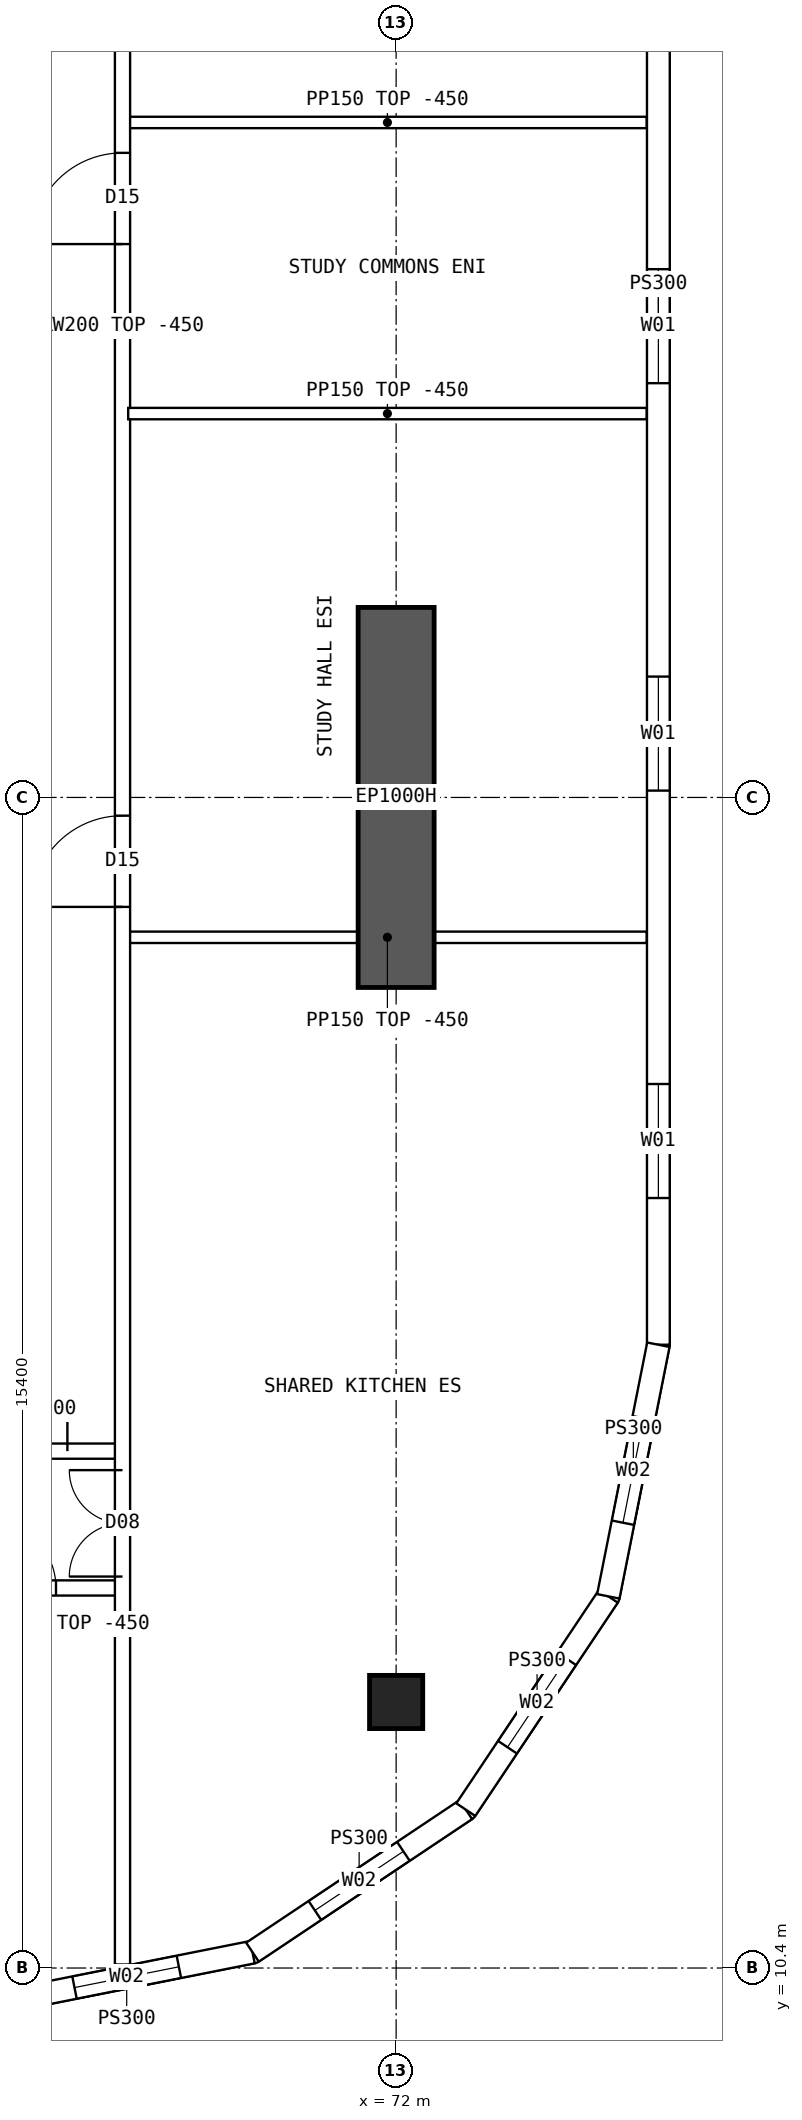
"""IFC4 building model, lengths in metres.
Left out: names, types, materials, properties, quantities, classifications, styles, units other than length and angle.
Written with IfcOpenShell. Run it as: python <this file> out.ifc"""

import sys

from ifc_helpers import new_model, si_unit, direction, frame, frame_2d, origin, origin_2d, place, context, subcontext, project, spatial, polyline, rectangle, hollow_rectangle, outline, extrude, element, fill, save


model = new_model("IFC4")
c1 = context("Model", 3, precision=1e-05, world=origin(), true_north=direction((0.0, 1.0)))
c2 = subcontext(c1, "Body", "Model", "MODEL_VIEW")
j1 = project(units=[si_unit("LENGTHUNIT", "METRE"), si_unit("PLANEANGLEUNIT", "RADIAN")], contexts=[c1])
p1 = place(None, origin())
s1 = spatial("IfcSite", under=j1, at=p1, CompositionType="ELEMENT")
p2 = place(p1, origin())
s2 = spatial("IfcBuilding", under=s1, at=p2, CompositionType="ELEMENT")
p3 = place(p2, frame((0.0, 0.0, 174.85)))
s3 = spatial("IfcBuildingStorey", under=s2, at=p3, CompositionType="ELEMENT", Elevation=174.85)
p4 = place(p3, frame((72.0, 13.9, 0.0), z_axis=(0.0, 0.0, 1.0), x_axis=(1.0, 0.0, 0.0)))
e1 = element("IfcColumn", 1, at=p4, inside=s3, PredefinedType="COLUMN", context=c2, shape_type="SweptSolid", body=[
    extrude(hollow_rectangle(XDim=0.7, YDim=0.7, WallThickness=0.07, at=origin_2d()), origin(), (0.0, 0.0, 1.0), 3.75),
])
p5 = place(p3, frame((72.0, 23.3, 0.0), z_axis=(0.0, 0.0, 1.0), x_axis=(0.0, 1.0, 0.0)))
e2 = element("IfcWall", 2, at=p5, inside=s3, PredefinedType="SHEAR", context=c2, shape_type="SweptSolid", body=[
    extrude(rectangle(XDim=5.0, YDim=1.0, at=frame_2d((2.5, 0.0))), origin(), (0.0, 0.0, 1.0), 3.75),
])
p6 = place(p3, frame((75.45, 18.6, 0.0), z_axis=(0.0, 0.0, 1.0), x_axis=(0.0, 1.0, 0.0)))
e3 = element("IfcWall", 3, at=p6, inside=s3, PredefinedType="SOLIDWALL", context=c2, shape_type="SweptSolid", body=[
    extrude(outline(polyline([(-0.015, -0.15), (26.815, -0.15), (26.785, 0.15), (0.015, 0.15), (-0.015, -0.15)])), origin(), (0.0, 0.0, 1.0), 3.3),
])
p7 = place(p6, frame((1.93, 0.0, 0.9)))
e4 = element("IfcOpeningElement", 4, at=p7, cuts=e3, PredefinedType="OPENING", context=c2, shape_type="SweptSolid", body=[
    extrude(rectangle(XDim=1.5, YDim=2.0, at=frame_2d((0.75, 1.0))), frame((0.0, 0.16, 0.0), z_axis=(0.0, -1.0, 0.0), x_axis=(1.0, 0.0, 0.0)), (0.0, 0.0, 1.0), 0.32),
])
p8 = place(p6, frame((7.29, 0.0, 0.9)))
e5 = element("IfcOpeningElement", 5, at=p8, cuts=e3, PredefinedType="OPENING", context=c2, shape_type="SweptSolid", body=[
    extrude(rectangle(XDim=1.5, YDim=2.0, at=frame_2d((0.75, 1.0))), frame((0.0, 0.16, 0.0), z_axis=(0.0, -1.0, 0.0), x_axis=(1.0, 0.0, 0.0)), (0.0, 0.0, 1.0), 0.32),
])
p9 = place(p6, frame((12.65, 0.0, 0.9)))
e6 = element("IfcOpeningElement", 6, at=p9, cuts=e3, PredefinedType="OPENING", context=c2, shape_type="SweptSolid", body=[
    extrude(rectangle(XDim=1.5, YDim=2.0, at=frame_2d((0.75, 1.0))), frame((0.0, 0.16, 0.0), z_axis=(0.0, -1.0, 0.0), x_axis=(1.0, 0.0, 0.0)), (0.0, 0.0, 1.0), 0.32),
])
p10 = place(p6, frame((18.01, 0.0, 0.9)))
e7 = element("IfcOpeningElement", 7, at=p10, cuts=e3, PredefinedType="OPENING", context=c2, shape_type="SweptSolid", body=[
    extrude(rectangle(XDim=1.5, YDim=2.0, at=frame_2d((0.75, 1.0))), frame((0.0, 0.16, 0.0), z_axis=(0.0, -1.0, 0.0), x_axis=(1.0, 0.0, 0.0)), (0.0, 0.0, 1.0), 0.32),
])
p11 = place(p6, frame((23.37, 0.0, 0.9)))
e8 = element("IfcOpeningElement", 8, at=p11, cuts=e3, PredefinedType="OPENING", context=c2, shape_type="SweptSolid", body=[
    extrude(rectangle(XDim=1.5, YDim=2.0, at=frame_2d((0.75, 1.0))), frame((0.0, 0.16, 0.0), z_axis=(0.0, -1.0, 0.0), x_axis=(1.0, 0.0, 0.0)), (0.0, 0.0, 1.0), 0.32),
])
p12 = place(p3, frame((66.8, 9.95, 0.0), z_axis=(0.0, 0.0, 1.0), x_axis=(0.98078325777, 0.195100490205, 0.0)))
e9 = element("IfcWall", 9, at=p12, inside=s3, PredefinedType="SOLIDWALL", context=c2, shape_type="SweptSolid", body=[
    extrude(outline(polyline([(-0.03, -0.15), (3.405, -0.15), (3.345, 0.15), (0.03, 0.15), (-0.03, -0.15)])), origin(), (0.0, 0.0, 1.0), 3.3),
])
p13 = place(p12, frame((0.988, 0.0, 0.9)))
e10 = element("IfcOpeningElement", 10, at=p13, cuts=e9, PredefinedType="OPENING", context=c2, shape_type="SweptSolid", body=[
    extrude(rectangle(XDim=1.4, YDim=1.8, at=frame_2d((0.7, 0.9))), frame((0.0, 0.16, 0.0), z_axis=(0.0, -1.0, 0.0), x_axis=(1.0, 0.0, 0.0)), (0.0, 0.0, 1.0), 0.32),
])
p14 = place(p3, frame((70.11, 10.608, 0.0), z_axis=(0.0, 0.0, 1.0), x_axis=(0.831493450887, 0.555534554399, 0.0)))
e11 = element("IfcWall", 11, at=p14, inside=s3, PredefinedType="SOLIDWALL", context=c2, shape_type="SweptSolid", body=[
    extrude(outline(polyline([(-0.03, -0.15), (3.405, -0.15), (3.345, 0.15), (0.03, 0.15), (-0.03, -0.15)])), origin(), (0.0, 0.0, 1.0), 3.3),
])
p15 = place(p14, frame((0.988, 0.0, 0.9)))
e12 = element("IfcOpeningElement", 12, at=p15, cuts=e11, PredefinedType="OPENING", context=c2, shape_type="SweptSolid", body=[
    extrude(rectangle(XDim=1.4, YDim=1.8, at=frame_2d((0.7, 0.9))), frame((0.0, 0.16, 0.0), z_axis=(0.0, -1.0, 0.0), x_axis=(1.0, 0.0, 0.0)), (0.0, 0.0, 1.0), 0.32),
])
p16 = place(p3, frame((72.917, 12.483, 0.0), z_axis=(0.0, 0.0, 1.0), x_axis=(0.555534554399, 0.831493450887, 0.0)))
e13 = element("IfcWall", 13, at=p16, inside=s3, PredefinedType="SOLIDWALL", context=c2, shape_type="SweptSolid", body=[
    extrude(outline(polyline([(-0.03, -0.15), (3.405, -0.15), (3.345, 0.15), (0.03, 0.15), (-0.03, -0.15)])), origin(), (0.0, 0.0, 1.0), 3.3),
])
p17 = place(p16, frame((0.988, 0.0, 0.9)))
e14 = element("IfcOpeningElement", 14, at=p17, cuts=e13, PredefinedType="OPENING", context=c2, shape_type="SweptSolid", body=[
    extrude(rectangle(XDim=1.4, YDim=1.8, at=frame_2d((0.7, 0.9))), frame((0.0, 0.16, 0.0), z_axis=(0.0, -1.0, 0.0), x_axis=(1.0, 0.0, 0.0)), (0.0, 0.0, 1.0), 0.32),
])
p18 = place(p3, frame((74.792, 15.29, 0.0), z_axis=(0.0, 0.0, 1.0), x_axis=(0.19508664885, 0.980786011034, 0.0)))
e15 = element("IfcWall", 15, at=p18, inside=s3, PredefinedType="SOLIDWALL", context=c2, shape_type="SweptSolid", body=[
    extrude(outline(polyline([(-0.03, -0.15), (3.39, -0.15), (3.36, 0.15), (0.03, 0.15), (-0.03, -0.15)])), origin(), (0.0, 0.0, 1.0), 3.3),
])
p19 = place(p18, frame((0.988, 0.0, 0.9)))
e16 = element("IfcOpeningElement", 16, at=p19, cuts=e15, PredefinedType="OPENING", context=c2, shape_type="SweptSolid", body=[
    extrude(rectangle(XDim=1.4, YDim=1.8, at=frame_2d((0.7, 0.9))), frame((0.0, 0.16, 0.0), z_axis=(0.0, -1.0, 0.0), x_axis=(1.0, 0.0, 0.0)), (0.0, 0.0, 1.0), 0.32),
])
p20 = place(p3, frame((66.425, 15.4, 0.0), z_axis=(0.0, 0.0, 1.0), x_axis=(1.0, 0.0, 0.0)))
e17 = element("IfcWall", 17, at=p20, inside=s3, PredefinedType="SOLIDWALL", context=c2, shape_type="SweptSolid", body=[
    extrude(rectangle(XDim=1.975, YDim=0.2, at=frame_2d((0.987, 0.0))), origin(), (0.0, 0.0, 1.0), 3.3),
])
p21 = place(p20, frame((0.2, 0.0, 0.0)))
e18 = element("IfcOpeningElement", 18, at=p21, cuts=e17, PredefinedType="OPENING", context=c2, shape_type="SweptSolid", body=[
    extrude(rectangle(XDim=0.9, YDim=2.1, at=frame_2d((0.45, 1.05))), frame((0.0, 0.11, 0.0), z_axis=(0.0, -1.0, 0.0), x_axis=(1.0, 0.0, 0.0)), (0.0, 0.0, 1.0), 0.22),
])
p22 = place(p3, frame((66.425, 17.2, 0.0), z_axis=(0.0, 0.0, 1.0), x_axis=(1.0, 0.0, 0.0)))
e19 = element("IfcWall", 19, at=p22, inside=s3, PredefinedType="SOLIDWALL", context=c2, shape_type="SweptSolid", body=[
    extrude(rectangle(XDim=1.975, YDim=0.2, at=frame_2d((0.987, 0.0))), origin(), (0.0, 0.0, 1.0), 3.3),
])
p23 = place(p22, frame((0.05, 0.0, 0.0)))
e20 = element("IfcOpeningElement", 20, at=p23, cuts=e19, PredefinedType="OPENING", context=c2, shape_type="SweptSolid", body=[
    extrude(rectangle(XDim=1.2, YDim=2.1, at=frame_2d((0.6, 1.05))), frame((0.0, 0.11, 0.0), z_axis=(0.0, -1.0, 0.0), x_axis=(1.0, 0.0, 0.0)), (0.0, 0.0, 1.0), 0.22),
])
p24 = place(p3, frame((68.475, 30.85, 0.0), z_axis=(0.0, 0.0, 1.0), x_axis=(1.0, 0.0, 0.0)))
e21 = element("IfcWall", 21, at=p24, inside=s3, PredefinedType="PARTITIONING", context=c2, shape_type="SweptSolid", body=[
    extrude(outline(polyline([(0.0, 0.0), (6.82, 0.0), (6.82, 3.3), (3.827, 3.3), (3.825, 2.85), (3.227, 2.85), (3.225, 3.3), (0.0, 3.3), (0.0, 0.0)])), frame((0.0, 0.075, 0.0), z_axis=(0.0, -1.0, 0.0), x_axis=(1.0, 0.0, 0.0)), (0.0, 0.0, 1.0), 0.15),
])
p25 = place(p3, frame((68.4, 10.446, 0.0), z_axis=(0.0, 0.0, 1.0), x_axis=(0.0, 1.0, 0.0)))
e22 = element("IfcWall", 22, at=p25, inside=s3, PredefinedType="SOLIDWALL", context=c2, shape_type="SweptSolid", body=[
    extrude(rectangle(XDim=43.107, YDim=0.2, at=frame_2d((21.554, 0.0))), origin(), (0.0, 0.0, 1.0), 3.3),
])
p26 = place(p25, frame((13.914, 0.0, 0.0)))
e23 = element("IfcOpeningElement", 23, at=p26, cuts=e22, PredefinedType="OPENING", context=c2, shape_type="SweptSolid", body=[
    extrude(rectangle(XDim=1.2, YDim=2.1, at=frame_2d((0.6, 1.05))), frame((0.0, 0.11, 0.0), z_axis=(0.0, -1.0, 0.0), x_axis=(1.0, 0.0, 0.0)), (0.0, 0.0, 1.0), 0.22),
])
p27 = place(p25, frame((22.634, 0.0, 0.0)))
e24 = element("IfcOpeningElement", 24, at=p27, cuts=e22, PredefinedType="OPENING", context=c2, shape_type="SweptSolid", body=[
    extrude(rectangle(XDim=1.2, YDim=2.1, at=frame_2d((0.6, 1.05))), frame((0.0, 0.11, 0.0), z_axis=(0.0, -1.0, 0.0), x_axis=(1.0, 0.0, 0.0)), (0.0, 0.0, 1.0), 0.22),
])
p28 = place(p25, frame((5.104, 0.0, 0.0)))
e25 = element("IfcOpeningElement", 25, at=p28, cuts=e22, PredefinedType="OPENING", context=c2, shape_type="SweptSolid", body=[
    extrude(rectangle(XDim=1.4, YDim=2.1, at=frame_2d((0.7, 1.05))), frame((0.0, 0.11, 0.0), z_axis=(0.0, -1.0, 0.0), x_axis=(1.0, 0.0, 0.0)), (0.0, 0.0, 1.0), 0.22),
])
p29 = place(p25, frame((36.504, 0.0, 0.0)))
e26 = element("IfcOpeningElement", 26, at=p29, cuts=e22, PredefinedType="OPENING", context=c2, shape_type="SweptSolid", body=[
    extrude(rectangle(XDim=1.4, YDim=2.1, at=frame_2d((0.7, 1.05))), frame((0.0, 0.11, 0.0), z_axis=(0.0, -1.0, 0.0), x_axis=(1.0, 0.0, 0.0)), (0.0, 0.0, 1.0), 0.22),
])
p30 = place(p3, frame((68.475, 23.96, 0.0), z_axis=(0.0, 0.0, 1.0), x_axis=(1.0, 0.0, 0.0)))
e27 = element("IfcWall", 27, at=p30, inside=s3, PredefinedType="PARTITIONING", context=c2, shape_type="SweptSolid", body=[
    extrude(rectangle(XDim=6.82, YDim=0.15, at=frame_2d((3.41, 0.0))), origin(), (0.0, 0.0, 1.0), 3.3),
])
p31 = place(p3, frame((68.475, 34.68, 0.0), z_axis=(0.0, 0.0, 1.0), x_axis=(1.0, 0.0, 0.0)))
e28 = element("IfcWall", 28, at=p31, inside=s3, PredefinedType="PARTITIONING", context=c2, shape_type="SweptSolid", body=[
    extrude(outline(polyline([(0.0, 0.0), (6.82, 0.0), (6.82, 3.3), (3.827, 3.3), (3.825, 2.85), (3.227, 2.85), (3.225, 3.3), (0.0, 3.3), (0.0, 0.0)])), frame((0.0, 0.075, 0.0), z_axis=(0.0, -1.0, 0.0), x_axis=(1.0, 0.0, 0.0)), (0.0, 0.0, 1.0), 0.15),
])
p32 = place(p7, origin())
e29 = element("IfcWindow", 29, at=p32, inside=s3, PartitioningType="SINGLE_PANEL", PredefinedType="WINDOW", context=c2, shape_type="SweptSolid", body=[
    extrude(rectangle(XDim=1.5, YDim=2.0, at=frame_2d((0.75, 1.0))), frame((0.0, 0.03, 0.0), z_axis=(0.0, -1.0, 0.0), x_axis=(1.0, 0.0, 0.0)), (0.0, 0.0, 1.0), 0.06),
])
fill(e4, e29)
p33 = place(p8, origin())
e30 = element("IfcWindow", 30, at=p33, inside=s3, PartitioningType="SINGLE_PANEL", PredefinedType="WINDOW", context=c2, shape_type="SweptSolid", body=[
    extrude(rectangle(XDim=1.5, YDim=2.0, at=frame_2d((0.75, 1.0))), frame((0.0, 0.03, 0.0), z_axis=(0.0, -1.0, 0.0), x_axis=(1.0, 0.0, 0.0)), (0.0, 0.0, 1.0), 0.06),
])
fill(e5, e30)
p34 = place(p9, origin())
e31 = element("IfcWindow", 31, at=p34, inside=s3, PartitioningType="SINGLE_PANEL", PredefinedType="WINDOW", context=c2, shape_type="SweptSolid", body=[
    extrude(rectangle(XDim=1.5, YDim=2.0, at=frame_2d((0.75, 1.0))), frame((0.0, 0.03, 0.0), z_axis=(0.0, -1.0, 0.0), x_axis=(1.0, 0.0, 0.0)), (0.0, 0.0, 1.0), 0.06),
])
fill(e6, e31)
p35 = place(p13, origin())
e32 = element("IfcWindow", 32, at=p35, inside=s3, PartitioningType="SINGLE_PANEL", PredefinedType="WINDOW", context=c2, shape_type="SweptSolid", body=[
    extrude(rectangle(XDim=1.4, YDim=1.8, at=frame_2d((0.7, 0.9))), frame((0.0, 0.03, 0.0), z_axis=(0.0, -1.0, 0.0), x_axis=(1.0, 0.0, 0.0)), (0.0, 0.0, 1.0), 0.06),
])
fill(e10, e32)
p36 = place(p15, origin())
e33 = element("IfcWindow", 33, at=p36, inside=s3, PartitioningType="SINGLE_PANEL", PredefinedType="WINDOW", context=c2, shape_type="SweptSolid", body=[
    extrude(rectangle(XDim=1.4, YDim=1.8, at=frame_2d((0.7, 0.9))), frame((0.0, 0.03, 0.0), z_axis=(0.0, -1.0, 0.0), x_axis=(1.0, 0.0, 0.0)), (0.0, 0.0, 1.0), 0.06),
])
fill(e12, e33)
p37 = place(p17, origin())
e34 = element("IfcWindow", 34, at=p37, inside=s3, PartitioningType="SINGLE_PANEL", PredefinedType="WINDOW", context=c2, shape_type="SweptSolid", body=[
    extrude(rectangle(XDim=1.4, YDim=1.8, at=frame_2d((0.7, 0.9))), frame((0.0, 0.03, 0.0), z_axis=(0.0, -1.0, 0.0), x_axis=(1.0, 0.0, 0.0)), (0.0, 0.0, 1.0), 0.06),
])
fill(e14, e34)
p38 = place(p19, origin())
e35 = element("IfcWindow", 35, at=p38, inside=s3, PartitioningType="SINGLE_PANEL", PredefinedType="WINDOW", context=c2, shape_type="SweptSolid", body=[
    extrude(rectangle(XDim=1.4, YDim=1.8, at=frame_2d((0.7, 0.9))), frame((0.0, 0.03, 0.0), z_axis=(0.0, -1.0, 0.0), x_axis=(1.0, 0.0, 0.0)), (0.0, 0.0, 1.0), 0.06),
])
fill(e16, e35)
p39 = place(p23, origin())
e36 = element("IfcDoor", 36, at=p39, inside=s3, OperationType="DOUBLE_DOOR_SINGLE_SWING", PredefinedType="DOOR", context=c2, shape_type="SweptSolid", body=[
    extrude(rectangle(XDim=1.2, YDim=2.1, at=frame_2d((0.6, 1.05))), frame((0.0, 0.025, 0.0), z_axis=(0.0, -1.0, 0.0), x_axis=(1.0, 0.0, 0.0)), (0.0, 0.0, 1.0), 0.05),
])
fill(e20, e36)
p40 = place(p26, origin())
e37 = element("IfcDoor", 37, at=p40, inside=s3, OperationType="SINGLE_SWING_LEFT", PredefinedType="DOOR", context=c2, shape_type="SweptSolid", body=[
    extrude(rectangle(XDim=1.2, YDim=2.1, at=frame_2d((0.6, 1.05))), frame((0.0, 0.025, 0.0), z_axis=(0.0, -1.0, 0.0), x_axis=(1.0, 0.0, 0.0)), (0.0, 0.0, 1.0), 0.05),
])
fill(e23, e37)
p41 = place(p27, origin())
e38 = element("IfcDoor", 38, at=p41, inside=s3, OperationType="SINGLE_SWING_LEFT", PredefinedType="DOOR", context=c2, shape_type="SweptSolid", body=[
    extrude(rectangle(XDim=1.2, YDim=2.1, at=frame_2d((0.6, 1.05))), frame((0.0, 0.025, 0.0), z_axis=(0.0, -1.0, 0.0), x_axis=(1.0, 0.0, 0.0)), (0.0, 0.0, 1.0), 0.05),
])
fill(e24, e38)
p42 = place(p28, origin())
e39 = element("IfcDoor", 39, at=p42, inside=s3, OperationType="DOUBLE_DOOR_SINGLE_SWING", PredefinedType="DOOR", context=c2, shape_type="SweptSolid", body=[
    extrude(rectangle(XDim=1.4, YDim=2.1, at=frame_2d((0.7, 1.05))), frame((0.0, 0.025, 0.0), z_axis=(0.0, -1.0, 0.0), x_axis=(1.0, 0.0, 0.0)), (0.0, 0.0, 1.0), 0.05),
])
fill(e25, e39)
p43 = place(p21, origin())
e40 = element("IfcDoor", 40, at=p43, inside=s3, OperationType="SINGLE_SWING_LEFT", PredefinedType="DOOR", context=c2, shape_type="SweptSolid", body=[
    extrude(rectangle(XDim=0.9, YDim=2.1, at=frame_2d((0.45, 1.05))), frame((0.0, 0.025, 0.0), z_axis=(0.0, -1.0, 0.0), x_axis=(1.0, 0.0, 0.0)), (0.0, 0.0, 1.0), 0.05),
])
fill(e18, e40)
save(model, sys.argv[1])
